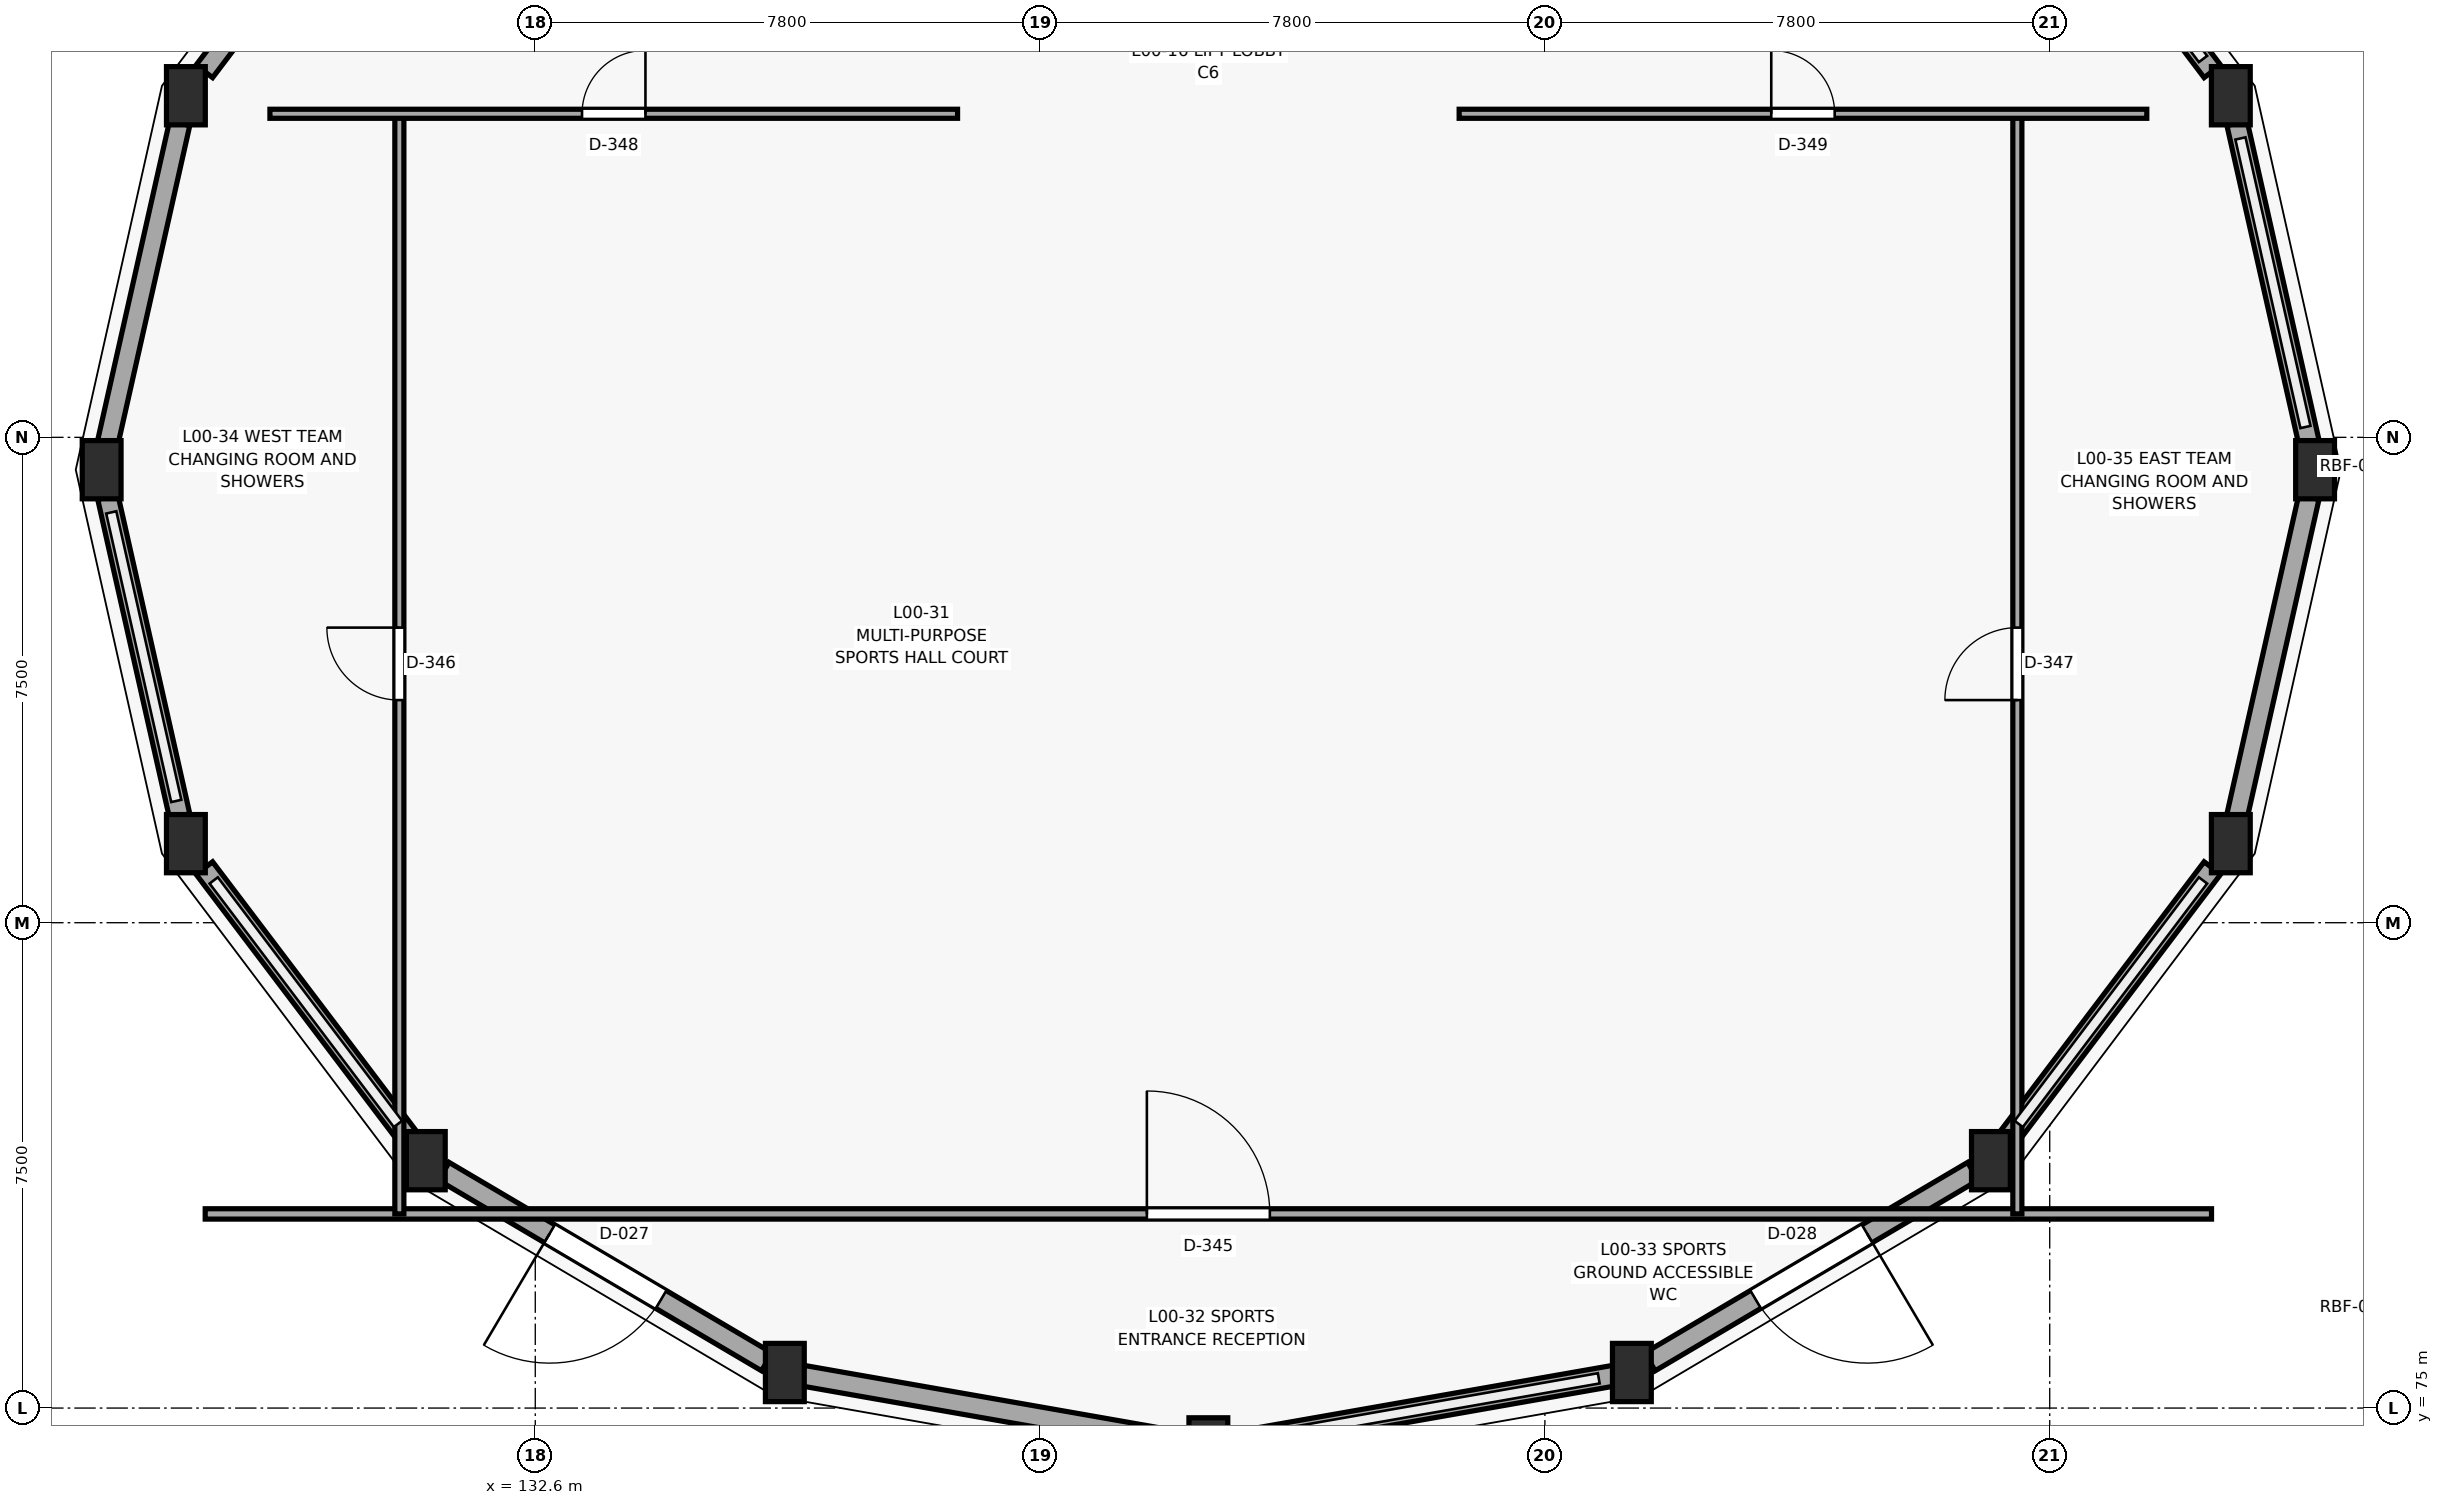
"""IFC4 building model, lengths in metres.
Left out: names, types, materials, properties, quantities, classifications, styles, units other than length and angle.
Written with IfcOpenShell. Run it as: python <this file> out.ifc"""

import sys

from ifc_helpers import new_model, si_unit, direction, frame, frame_2d, origin, origin_2d, place, context, subcontext, project, spatial, rectangle, extrude, element, fill, save


model = new_model("IFC4")
c1 = context("Model", 3, precision=1e-05, world=origin(), true_north=direction((0.0, 1.0)))
c2 = subcontext(c1, "Body", "Model", "MODEL_VIEW")
j1 = project(units=[si_unit("LENGTHUNIT", "METRE"), si_unit("PLANEANGLEUNIT", "RADIAN")], contexts=[c1])
p1 = place(None, origin())
s1 = spatial("IfcSite", under=j1, at=p1, CompositionType="ELEMENT")
p2 = place(p1, origin())
s2 = spatial("IfcBuilding", under=s1, at=p2, CompositionType="ELEMENT")
p3 = place(p2, origin())
s3 = spatial("IfcBuildingStorey", under=s2, at=p3, CompositionType="ELEMENT", Elevation=0.0)
for number, where, z_axis, x_axis in (
    (1, (160.1, 89.5, 0.0), (0.0, 0.0, 1.0), (1.0, 0.0, 0.0)),
    (2, (158.798, 95.279, 0.0), (0.0, 0.0, 1.0), (1.0, 0.0, 0.0)),
    (3, (127.202, 95.279, 0.0), (0.0, 0.0, 1.0), (1.0, 0.0, 0.0)),
    (4, (125.9, 89.5, 0.0), (0.0, 0.0, 1.0), (1.0, 0.0, 0.0)),
    (5, (127.202, 83.721, 0.0), (0.0, 0.0, 1.0), (1.0, 0.0, 0.0)),
    (6, (130.908, 78.823, 0.0), (0.0, 0.0, 1.0), (1.0, 0.0, 0.0)),
    (7, (136.456, 75.549, 0.0), (0.0, 0.0, 1.0), (1.0, 0.0, 0.0)),
    (8, (143.0, 74.4, 0.0), (0.0, 0.0, 1.0), (1.0, 0.0, 0.0)),
    (9, (149.544, 75.549, 0.0), (0.0, 0.0, 1.0), (1.0, 0.0, 0.0)),
    (10, (155.092, 78.823, 0.0), (0.0, 0.0, 1.0), (1.0, 0.0, 0.0)),
    (11, (158.798, 83.721, 0.0), (0.0, 0.0, 1.0), (1.0, 0.0, 0.0)),
):
    element("IfcColumn", number, at=place(p3, frame(where, z_axis=z_axis, x_axis=x_axis)), inside=s3, PredefinedType="COLUMN", context=c2, shape_type="SweptSolid", body=[
        extrude(rectangle(XDim=0.6, YDim=0.9, at=origin_2d()), origin(), (0.0, 0.0, 1.0), 4.5),
    ])
p4 = place(p3, frame((158.894, 94.853, 0.0), z_axis=(0.0, 0.0, 1.0), x_axis=(0.219744533343, -0.97555745093, 0.0)))
e12 = element("IfcWall", 12, at=p4, inside=s3, PredefinedType="STANDARD", context=c2, shape_type="SweptSolid", body=[
    extrude(rectangle(XDim=5.051, YDim=0.32, at=frame_2d((2.525, 0.0))), origin(), (0.0, 0.0, 1.0), 0.85),
])
p5 = place(p3, frame((155.376, 99.801, 0.0), z_axis=(0.0, 0.0, 1.0), x_axis=(0.603398282319, -0.797439974477, 0.0)))
e13 = element("IfcWall", 13, at=p5, inside=s3, PredefinedType="STANDARD", context=c2, shape_type="SweptSolid", body=[
    extrude(rectangle(XDim=5.199, YDim=0.32, at=frame_2d((2.599, 0.0))), origin(), (0.0, 0.0, 1.0), 0.85),
])
p6 = place(p3, frame((127.487, 95.655, 0.0), z_axis=(0.0, 0.0, 1.0), x_axis=(0.603398282319, 0.797439974477, 0.0)))
e14 = element("IfcWall", 14, at=p6, inside=s3, PredefinedType="STANDARD", context=c2, shape_type="SweptSolid", body=[
    extrude(rectangle(XDim=5.199, YDim=0.32, at=frame_2d((2.599, 0.0))), origin(), (0.0, 0.0, 1.0), 3.445),
])
p7 = place(p6, frame((1.599, 0.0, 0.0)))
e15 = element("IfcOpeningElement", 15, at=p7, cuts=e14, PredefinedType="OPENING", context=c2, shape_type="SweptSolid", body=[
    extrude(rectangle(XDim=2.0, YDim=2.3, at=frame_2d((1.0, 1.15))), frame((0.0, 0.17, 0.0), z_axis=(0.0, -1.0, 0.0), x_axis=(1.0, 0.0, 0.0)), (0.0, 0.0, 1.0), 0.34),
])
p8 = place(p3, frame((125.996, 89.926, 0.0), z_axis=(0.0, 0.0, 1.0), x_axis=(0.219744533343, 0.97555745093, 0.0)))
e16 = element("IfcWall", 16, at=p8, inside=s3, PredefinedType="STANDARD", context=c2, shape_type="SweptSolid", body=[
    extrude(rectangle(XDim=5.051, YDim=0.32, at=frame_2d((2.525, 0.0))), origin(), (0.0, 0.0, 1.0), 3.445),
])
p9 = place(p8, frame((1.45, 0.0, 0.9)))
e17 = element("IfcOpeningElement", 17, at=p9, cuts=e16, PredefinedType="OPENING", context=c2, shape_type="SweptSolid", body=[
    extrude(rectangle(XDim=2.15, YDim=1.55, at=frame_2d((1.075, 0.775))), frame((0.0, 0.17, 0.0), z_axis=(0.0, -1.0, 0.0), x_axis=(1.0, 0.0, 0.0)), (0.0, 0.0, 1.0), 0.34),
])
p10 = place(p3, frame((127.106, 84.147, 0.0), z_axis=(0.0, 0.0, 1.0), x_axis=(-0.219744533343, 0.97555745093, 0.0)))
e18 = element("IfcWall", 18, at=p10, inside=s3, PredefinedType="STANDARD", context=c2, shape_type="SweptSolid", body=[
    extrude(rectangle(XDim=5.051, YDim=0.32, at=frame_2d((2.525, 0.0))), origin(), (0.0, 0.0, 1.0), 0.85),
])
p11 = place(p3, frame((130.624, 79.199, 0.0), z_axis=(0.0, 0.0, 1.0), x_axis=(-0.603398282319, 0.797439974477, 0.0)))
e19 = element("IfcWall", 19, at=p11, inside=s3, PredefinedType="STANDARD", context=c2, shape_type="SweptSolid", body=[
    extrude(rectangle(XDim=5.199, YDim=0.32, at=frame_2d((2.599, 0.0))), origin(), (0.0, 0.0, 1.0), 0.85),
])
p12 = place(p3, frame((136.177, 75.714, 0.0), z_axis=(0.0, 0.0, 1.0), x_axis=(-0.861235880181, 0.508205429614, 0.0)))
e20 = element("IfcWall", 20, at=p12, inside=s3, PredefinedType="STANDARD", context=c2, shape_type="SweptSolid", body=[
    extrude(rectangle(XDim=5.794, YDim=0.32, at=frame_2d((2.897, 0.0))), origin(), (0.0, 0.0, 1.0), 3.445),
])
p13 = place(p12, frame((1.897, 0.0, 0.0)))
e21 = element("IfcOpeningElement", 21, at=p13, cuts=e20, PredefinedType="OPENING", context=c2, shape_type="SweptSolid", body=[
    extrude(rectangle(XDim=2.0, YDim=2.3, at=frame_2d((1.0, 1.15))), frame((0.0, 0.17, 0.0), z_axis=(0.0, -1.0, 0.0), x_axis=(1.0, 0.0, 0.0)), (0.0, 0.0, 1.0), 0.34),
])
p14 = place(p3, frame((142.725, 74.448, 0.0), z_axis=(0.0, 0.0, 1.0), x_axis=(-0.984927418504, 0.172968148166, 0.0)))
e22 = element("IfcWall", 22, at=p14, inside=s3, PredefinedType="STANDARD", context=c2, shape_type="SweptSolid", body=[
    extrude(rectangle(XDim=6.085, YDim=0.32, at=frame_2d((3.042, 0.0))), origin(), (0.0, 0.0, 1.0), 3.445),
])
p15 = place(p14, frame((1.867, 0.0, 0.9)))
e23 = element("IfcOpeningElement", 23, at=p15, cuts=e22, PredefinedType="OPENING", context=c2, shape_type="SweptSolid", body=[
    extrude(rectangle(XDim=2.35, YDim=1.55, at=frame_2d((1.175, 0.775))), frame((0.0, 0.17, 0.0), z_axis=(0.0, -1.0, 0.0), x_axis=(1.0, 0.0, 0.0)), (0.0, 0.0, 1.0), 0.34),
])
p16 = place(p3, frame((149.269, 75.501, 0.0), z_axis=(0.0, 0.0, 1.0), x_axis=(-0.984927418504, -0.172968148166, 0.0)))
e24 = element("IfcWall", 24, at=p16, inside=s3, PredefinedType="STANDARD", context=c2, shape_type="SweptSolid", body=[
    extrude(rectangle(XDim=6.085, YDim=0.32, at=frame_2d((3.042, 0.0))), origin(), (0.0, 0.0, 1.0), 0.85),
])
p17 = place(p3, frame((154.813, 78.658, 0.0), z_axis=(0.0, 0.0, 1.0), x_axis=(-0.861235880181, -0.508205429614, 0.0)))
e25 = element("IfcWall", 25, at=p17, inside=s3, PredefinedType="STANDARD", context=c2, shape_type="SweptSolid", body=[
    extrude(rectangle(XDim=5.794, YDim=0.32, at=frame_2d((2.897, 0.0))), origin(), (0.0, 0.0, 1.0), 3.445),
])
p18 = place(p17, frame((1.897, 0.0, 0.0)))
e26 = element("IfcOpeningElement", 26, at=p18, cuts=e25, PredefinedType="OPENING", context=c2, shape_type="SweptSolid", body=[
    extrude(rectangle(XDim=2.0, YDim=2.3, at=frame_2d((1.0, 1.15))), frame((0.0, 0.17, 0.0), z_axis=(0.0, -1.0, 0.0), x_axis=(1.0, 0.0, 0.0)), (0.0, 0.0, 1.0), 0.34),
])
p19 = place(p3, frame((158.513, 83.345, 0.0), z_axis=(0.0, 0.0, 1.0), x_axis=(-0.603398282319, -0.797439974477, 0.0)))
e27 = element("IfcWall", 27, at=p19, inside=s3, PredefinedType="STANDARD", context=c2, shape_type="SweptSolid", body=[
    extrude(rectangle(XDim=5.199, YDim=0.32, at=frame_2d((2.599, 0.0))), origin(), (0.0, 0.0, 1.0), 0.85),
])
p20 = place(p3, frame((160.004, 89.074, 0.0), z_axis=(0.0, 0.0, 1.0), x_axis=(-0.219744533343, -0.97555745093, 0.0)))
e28 = element("IfcWall", 28, at=p20, inside=s3, PredefinedType="STANDARD", context=c2, shape_type="SweptSolid", body=[
    extrude(rectangle(XDim=5.051, YDim=0.32, at=frame_2d((2.525, 0.0))), origin(), (0.0, 0.0, 1.0), 3.445),
])
p21 = place(p20, frame((1.225, 0.0, 0.9)))
e29 = element("IfcOpeningElement", 29, at=p21, cuts=e28, PredefinedType="OPENING", context=c2, shape_type="SweptSolid", body=[
    extrude(rectangle(XDim=2.6, YDim=1.55, at=frame_2d((1.3, 0.775))), frame((0.0, 0.17, 0.0), z_axis=(0.0, -1.0, 0.0), x_axis=(1.0, 0.0, 0.0)), (0.0, 0.0, 1.0), 0.34),
])
p22 = place(p3, frame((127.5, 78.0, 0.0), z_axis=(0.0, 0.0, 1.0), x_axis=(1.0, 0.0, 0.0)))
e30 = element("IfcWall", 30, at=p22, inside=s3, PredefinedType="PARTITIONING", context=c2, shape_type="SweptSolid", body=[
    extrude(rectangle(XDim=31.0, YDim=0.16, at=frame_2d((15.5, 0.0))), origin(), (0.0, 0.0, 1.0), 4.255),
])
p23 = place(p22, frame((14.55, 0.0, 0.0)))
e31 = element("IfcOpeningElement", 31, at=p23, cuts=e30, PredefinedType="OPENING", context=c2, shape_type="SweptSolid", body=[
    extrude(rectangle(XDim=1.9, YDim=2.25, at=frame_2d((0.95, 1.125))), frame((0.0, 0.09, 0.0), z_axis=(0.0, -1.0, 0.0), x_axis=(1.0, 0.0, 0.0)), (0.0, 0.0, 1.0), 0.18),
])
p24 = place(p3, frame((130.5, 78.0, 0.0), z_axis=(0.0, 0.0, 1.0), x_axis=(0.0, 1.0, 0.0)))
e32 = element("IfcWall", 32, at=p24, inside=s3, PredefinedType="PARTITIONING", context=c2, shape_type="SweptSolid", body=[
    extrude(rectangle(XDim=17.0, YDim=0.14, at=frame_2d((8.5, 0.0))), origin(), (0.0, 0.0, 1.0), 4.255),
])
p25 = place(p24, frame((7.94, 0.0, 0.0)))
e33 = element("IfcOpeningElement", 33, at=p25, cuts=e32, PredefinedType="OPENING", context=c2, shape_type="SweptSolid", body=[
    extrude(rectangle(XDim=1.12, YDim=2.1, at=frame_2d((0.56, 1.05))), frame((0.0, 0.08, 0.0), z_axis=(0.0, -1.0, 0.0), x_axis=(1.0, 0.0, 0.0)), (0.0, 0.0, 1.0), 0.16),
])
p26 = place(p3, frame((155.5, 78.0, 0.0), z_axis=(0.0, 0.0, 1.0), x_axis=(0.0, 1.0, 0.0)))
e34 = element("IfcWall", 34, at=p26, inside=s3, PredefinedType="PARTITIONING", context=c2, shape_type="SweptSolid", body=[
    extrude(rectangle(XDim=17.0, YDim=0.14, at=frame_2d((8.5, 0.0))), origin(), (0.0, 0.0, 1.0), 4.255),
])
p27 = place(p26, frame((7.94, 0.0, 0.0)))
e35 = element("IfcOpeningElement", 35, at=p27, cuts=e34, PredefinedType="OPENING", context=c2, shape_type="SweptSolid", body=[
    extrude(rectangle(XDim=1.12, YDim=2.1, at=frame_2d((0.56, 1.05))), frame((0.0, 0.08, 0.0), z_axis=(0.0, -1.0, 0.0), x_axis=(1.0, 0.0, 0.0)), (0.0, 0.0, 1.0), 0.16),
])
p28 = place(p3, frame((128.5, 95.0, 0.0), z_axis=(0.0, 0.0, 1.0), x_axis=(1.0, 0.0, 0.0)))
e36 = element("IfcWall", 36, at=p28, inside=s3, PredefinedType="PARTITIONING", context=c2, shape_type="SweptSolid", body=[
    extrude(rectangle(XDim=10.625, YDim=0.14, at=frame_2d((5.312, 0.0))), origin(), (0.0, 0.0, 1.0), 4.255),
])
p29 = place(p28, frame((4.823, 0.0, 0.0)))
e37 = element("IfcOpeningElement", 37, at=p29, cuts=e36, PredefinedType="OPENING", context=c2, shape_type="SweptSolid", body=[
    extrude(rectangle(XDim=0.98, YDim=2.1, at=frame_2d((0.49, 1.05))), frame((0.0, 0.08, 0.0), z_axis=(0.0, -1.0, 0.0), x_axis=(1.0, 0.0, 0.0)), (0.0, 0.0, 1.0), 0.16),
])
p30 = place(p3, frame((146.875, 95.0, 0.0), z_axis=(0.0, 0.0, 1.0), x_axis=(1.0, 0.0, 0.0)))
e38 = element("IfcWall", 38, at=p30, inside=s3, PredefinedType="PARTITIONING", context=c2, shape_type="SweptSolid", body=[
    extrude(rectangle(XDim=10.625, YDim=0.14, at=frame_2d((5.312, 0.0))), origin(), (0.0, 0.0, 1.0), 4.255),
])
p31 = place(p30, frame((4.823, 0.0, 0.0)))
e39 = element("IfcOpeningElement", 39, at=p31, cuts=e38, PredefinedType="OPENING", context=c2, shape_type="SweptSolid", body=[
    extrude(rectangle(XDim=0.98, YDim=2.1, at=frame_2d((0.49, 1.05))), frame((0.0, 0.08, 0.0), z_axis=(0.0, -1.0, 0.0), x_axis=(1.0, 0.0, 0.0)), (0.0, 0.0, 1.0), 0.16),
])
p32 = place(p9, origin())
e40 = element("IfcWindow", 40, at=p32, inside=s3, PartitioningType="SINGLE_PANEL", PredefinedType="WINDOW", context=c2, shape_type="SweptSolid", body=[
    extrude(rectangle(XDim=2.15, YDim=1.55, at=frame_2d((1.075, 0.775))), frame((0.0, 0.03, 0.0), z_axis=(0.0, -1.0, 0.0), x_axis=(1.0, 0.0, 0.0)), (0.0, 0.0, 1.0), 0.06),
])
fill(e17, e40)
p33 = place(p13, origin())
e41 = element("IfcDoor", 41, at=p33, inside=s3, OperationType="SINGLE_SWING_RIGHT", PredefinedType="DOOR", context=c2, shape_type="SweptSolid", body=[
    extrude(rectangle(XDim=2.0, YDim=2.3, at=frame_2d((1.0, 1.15))), frame((0.0, 0.025, 0.0), z_axis=(0.0, -1.0, 0.0), x_axis=(1.0, 0.0, 0.0)), (0.0, 0.0, 1.0), 0.05),
])
fill(e21, e41)
p34 = place(p15, origin())
e42 = element("IfcWindow", 42, at=p34, inside=s3, PartitioningType="SINGLE_PANEL", PredefinedType="WINDOW", context=c2, shape_type="SweptSolid", body=[
    extrude(rectangle(XDim=2.35, YDim=1.55, at=frame_2d((1.175, 0.775))), frame((0.0, 0.03, 0.0), z_axis=(0.0, -1.0, 0.0), x_axis=(1.0, 0.0, 0.0)), (0.0, 0.0, 1.0), 0.06),
])
fill(e23, e42)
p35 = place(p18, origin())
e43 = element("IfcDoor", 43, at=p35, inside=s3, OperationType="SINGLE_SWING_LEFT", PredefinedType="DOOR", context=c2, shape_type="SweptSolid", body=[
    extrude(rectangle(XDim=2.0, YDim=2.3, at=frame_2d((1.0, 1.15))), frame((0.0, 0.025, 0.0), z_axis=(0.0, -1.0, 0.0), x_axis=(1.0, 0.0, 0.0)), (0.0, 0.0, 1.0), 0.05),
])
fill(e26, e43)
p36 = place(p21, origin())
e44 = element("IfcWindow", 44, at=p36, inside=s3, PartitioningType="SINGLE_PANEL", PredefinedType="WINDOW", context=c2, shape_type="SweptSolid", body=[
    extrude(rectangle(XDim=2.6, YDim=1.55, at=frame_2d((1.3, 0.775))), frame((0.0, 0.03, 0.0), z_axis=(0.0, -1.0, 0.0), x_axis=(1.0, 0.0, 0.0)), (0.0, 0.0, 1.0), 0.06),
])
fill(e29, e44)
p37 = place(p23, origin())
e45 = element("IfcDoor", 45, at=p37, inside=s3, OperationType="SINGLE_SWING_LEFT", PredefinedType="DOOR", context=c2, shape_type="SweptSolid", body=[
    extrude(rectangle(XDim=1.9, YDim=2.25, at=frame_2d((0.95, 1.125))), frame((0.0, 0.025, 0.0), z_axis=(0.0, -1.0, 0.0), x_axis=(1.0, 0.0, 0.0)), (0.0, 0.0, 1.0), 0.05),
])
fill(e31, e45)
p38 = place(p25, origin())
e46 = element("IfcDoor", 46, at=p38, inside=s3, OperationType="SINGLE_SWING_RIGHT", PredefinedType="DOOR", context=c2, shape_type="SweptSolid", body=[
    extrude(rectangle(XDim=1.12, YDim=2.1, at=frame_2d((0.56, 1.05))), frame((0.0, 0.025, 0.0), z_axis=(0.0, -1.0, 0.0), x_axis=(1.0, 0.0, 0.0)), (0.0, 0.0, 1.0), 0.05),
])
fill(e33, e46)
p39 = place(p27, origin())
e47 = element("IfcDoor", 47, at=p39, inside=s3, OperationType="SINGLE_SWING_LEFT", PredefinedType="DOOR", context=c2, shape_type="SweptSolid", body=[
    extrude(rectangle(XDim=1.12, YDim=2.1, at=frame_2d((0.56, 1.05))), frame((0.0, 0.025, 0.0), z_axis=(0.0, -1.0, 0.0), x_axis=(1.0, 0.0, 0.0)), (0.0, 0.0, 1.0), 0.05),
])
fill(e35, e47)
p40 = place(p29, origin())
e48 = element("IfcDoor", 48, at=p40, inside=s3, OperationType="SINGLE_SWING_RIGHT", PredefinedType="DOOR", context=c2, shape_type="SweptSolid", body=[
    extrude(rectangle(XDim=0.98, YDim=2.1, at=frame_2d((0.49, 1.05))), frame((0.0, 0.025, 0.0), z_axis=(0.0, -1.0, 0.0), x_axis=(1.0, 0.0, 0.0)), (0.0, 0.0, 1.0), 0.05),
])
fill(e37, e48)
p41 = place(p31, origin())
e49 = element("IfcDoor", 49, at=p41, inside=s3, OperationType="SINGLE_SWING_LEFT", PredefinedType="DOOR", context=c2, shape_type="SweptSolid", body=[
    extrude(rectangle(XDim=0.98, YDim=2.1, at=frame_2d((0.49, 1.05))), frame((0.0, 0.025, 0.0), z_axis=(0.0, -1.0, 0.0), x_axis=(1.0, 0.0, 0.0)), (0.0, 0.0, 1.0), 0.05),
])
fill(e39, e49)
save(model, sys.argv[1])
